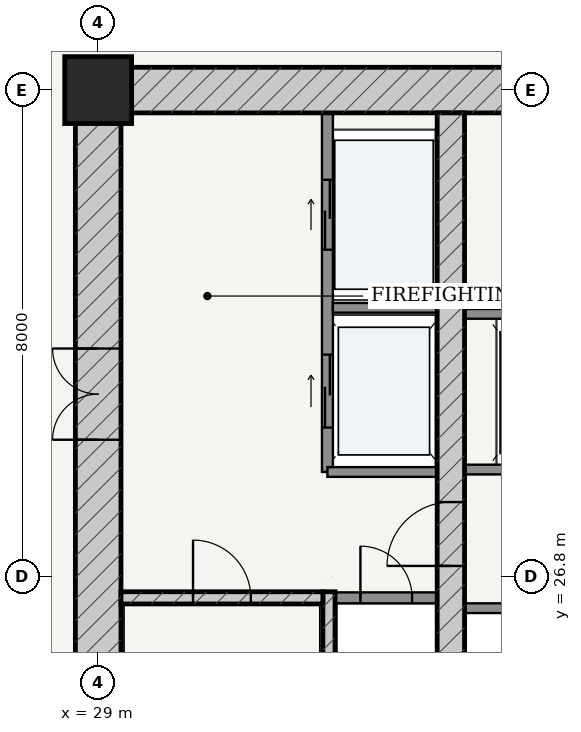
"""IFC4 building model, lengths in metres.
Left out: names, types, materials, properties, quantities, classifications, styles, units other than length and angle.
Written with IfcOpenShell. Run it as: python <this file> out.ifc"""

import sys

from ifc_helpers import new_model, si_unit, direction, frame, frame_2d, origin, origin_2d, place, context, subcontext, project, spatial, rectangle, extrude, source, transform, mapped, element, fill, save


model = new_model("IFC4")
c1 = context("Model", 3, precision=1e-05, world=origin(), true_north=direction((-0.2419218956, 0.970295726276)))
c2 = subcontext(c1, "Body", "Model", "MODEL_VIEW")
j1 = project(units=[si_unit("LENGTHUNIT", "METRE"), si_unit("PLANEANGLEUNIT", "RADIAN")], contexts=[c1])
p1 = place(None, origin())
s1 = spatial("IfcSite", under=j1, at=p1, CompositionType="ELEMENT")
p2 = place(p1, origin())
s2 = spatial("IfcBuilding", under=s1, at=p2, CompositionType="ELEMENT")
p3 = place(p2, frame((0.0, 0.0, 70.8)))
s3 = spatial("IfcBuildingStorey", under=s2, at=p3, CompositionType="ELEMENT", Elevation=70.8)
p4 = place(p3, frame((29.0, 34.8, 0.0), z_axis=(0.0, 0.0, 1.0), x_axis=(1.0, 0.0, 0.0)))
e1 = element("IfcColumn", 1, at=p4, inside=s3, PredefinedType="COLUMN", context=c2, shape_type="SweptSolid", body=[
    extrude(rectangle(XDim=1.1, YDim=1.1, at=origin_2d()), origin(), (0.0, 0.0, 1.0), 3.6),
])
p5 = place(p3, frame((28.625, 34.8, 0.0), z_axis=(0.0, 0.0, 1.0), x_axis=(1.0, 0.0, 0.0)))
e2 = element("IfcWall", 2, at=p5, inside=s3, PredefinedType="SHEAR", context=c2, shape_type="SweptSolid", body=[
    extrude(rectangle(XDim=18.75, YDim=0.75, at=frame_2d((9.375, 0.0))), origin(), (0.0, 0.0, 1.0), 3.15),
])
p6 = place(p5, frame((7.407, 0.0, 0.0)))
e3 = element("IfcOpeningElement", 3, at=p6, cuts=e2, PredefinedType="OPENING", context=c2, shape_type="SweptSolid", body=[
    extrude(rectangle(XDim=0.86, YDim=2.1, at=frame_2d((0.43, 1.05))), frame((0.0, 0.385, 0.0), z_axis=(0.0, -1.0, 0.0), x_axis=(1.0, 0.0, 0.0)), (0.0, 0.0, 1.0), 0.77),
])
p7 = place(p5, frame((10.488, 0.0, 0.0)))
e4 = element("IfcOpeningElement", 4, at=p7, cuts=e2, PredefinedType="OPENING", context=c2, shape_type="SweptSolid", body=[
    extrude(rectangle(XDim=0.85, YDim=2.1, at=frame_2d((0.425, 1.05))), frame((0.0, 0.385, 0.0), z_axis=(0.0, -1.0, 0.0), x_axis=(1.0, 0.0, 0.0)), (0.0, 0.0, 1.0), 0.77),
])
p8 = place(p3, frame((29.0, 19.175, 0.0), z_axis=(0.0, 0.0, 1.0), x_axis=(0.0, 1.0, 0.0)))
e5 = element("IfcWall", 5, at=p8, inside=s3, PredefinedType="SHEAR", context=c2, shape_type="SweptSolid", body=[
    extrude(rectangle(XDim=15.25, YDim=0.75, at=frame_2d((7.625, 0.0))), origin(), (0.0, 0.0, 1.0), 3.15),
])
p9 = place(p8, frame((9.875, 0.0, 0.0)))
e6 = element("IfcOpeningElement", 6, at=p9, cuts=e5, PredefinedType="OPENING", context=c2, shape_type="SweptSolid", body=[
    extrude(rectangle(XDim=1.5, YDim=2.2, at=frame_2d((0.75, 1.1))), frame((0.0, 0.385, 0.0), z_axis=(0.0, -1.0, 0.0), x_axis=(1.0, 0.0, 0.0)), (0.0, 0.0, 1.0), 0.77),
])
p10 = place(p3, frame((32.795, 19.175, 0.0), z_axis=(0.0, 0.0, 1.0), x_axis=(0.0, 1.0, 0.0)))
e7 = element("IfcWall", 7, at=p10, inside=s3, PredefinedType="SOLIDWALL", context=c2, shape_type="SweptSolid", body=[
    extrude(rectangle(XDim=7.375, YDim=0.2, at=frame_2d((3.688, 0.0))), origin(), (0.0, 0.0, 1.0), 3.15),
])
p11 = place(p3, frame((29.375, 26.45, 0.0), z_axis=(0.0, 0.0, 1.0), x_axis=(1.0, 0.0, 0.0)))
e8 = element("IfcWall", 8, at=p11, inside=s3, PredefinedType="SOLIDWALL", context=c2, shape_type="SweptSolid", body=[
    extrude(rectangle(XDim=3.32, YDim=0.2, at=frame_2d((1.66, 0.0))), origin(), (0.0, 0.0, 1.0), 3.15),
])
p12 = place(p11, frame((1.185, 0.0, 0.0)))
e9 = element("IfcOpeningElement", 9, at=p12, cuts=e8, PredefinedType="OPENING", context=c2, shape_type="SweptSolid", body=[
    extrude(rectangle(XDim=0.95, YDim=2.15, at=frame_2d((0.475, 1.075))), frame((0.0, 0.11, 0.0), z_axis=(0.0, -1.0, 0.0), x_axis=(1.0, 0.0, 0.0)), (0.0, 0.0, 1.0), 0.22),
])
p13 = place(p3, frame((34.8, 19.175, 0.0), z_axis=(0.0, 0.0, 1.0), x_axis=(0.0, 1.0, 0.0)))
e10 = element("IfcWall", 10, at=p13, inside=s3, PredefinedType="SHEAR", context=c2, shape_type="SweptSolid", body=[
    extrude(rectangle(XDim=15.25, YDim=0.45, at=frame_2d((7.625, 0.0))), origin(), (0.0, 0.0, 1.0), 3.15),
])
p14 = place(p13, frame((7.8, 0.0, 0.0)))
e11 = element("IfcOpeningElement", 11, at=p14, cuts=e10, PredefinedType="OPENING", context=c2, shape_type="SweptSolid", body=[
    extrude(rectangle(XDim=1.05, YDim=2.15, at=frame_2d((0.525, 1.075))), frame((0.0, 0.235, 0.0), z_axis=(0.0, -1.0, 0.0), x_axis=(1.0, 0.0, 0.0)), (0.0, 0.0, 1.0), 0.47),
])
p15 = place(p3, frame((32.9, 26.45, 0.0), z_axis=(0.0, 0.0, 1.0), x_axis=(1.0, 0.0, 0.0)))
e12 = element("IfcWall", 12, at=p15, inside=s3, PredefinedType="PARTITIONING", context=c2, shape_type="SweptSolid", body=[
    extrude(rectangle(XDim=1.675, YDim=0.18, at=frame_2d((0.837, 0.0))), origin(), (0.0, 0.0, 1.0), 3.15),
])
p16 = place(p15, frame((0.413, 0.0, 0.0)))
e13 = element("IfcOpeningElement", 13, at=p16, cuts=e12, PredefinedType="OPENING", context=c2, shape_type="SweptSolid", body=[
    extrude(rectangle(XDim=0.85, YDim=2.1, at=frame_2d((0.425, 1.05))), frame((0.0, 0.1, 0.0), z_axis=(0.0, -1.0, 0.0), x_axis=(1.0, 0.0, 0.0)), (0.0, 0.0, 1.0), 0.2),
])
p17 = place(p3, frame((32.77, 28.52, 0.0), z_axis=(0.0, 0.0, 1.0), x_axis=(0.0, 1.0, 0.0)))
e14 = element("IfcWall", 14, at=p17, inside=s3, PredefinedType="PARTITIONING", context=c2, shape_type="SweptSolid", body=[
    extrude(rectangle(XDim=5.905, YDim=0.18, at=frame_2d((2.953, 0.0))), origin(), (0.0, 0.0, 1.0), 3.15),
])
p18 = place(p17, frame((3.655, 0.0, 0.0)))
e15 = element("IfcOpeningElement", 15, at=p18, cuts=e14, PredefinedType="OPENING", context=c2, shape_type="SweptSolid", body=[
    extrude(rectangle(XDim=1.15, YDim=2.2, at=frame_2d((0.575, 1.1))), frame((0.0, 0.1, 0.0), z_axis=(0.0, -1.0, 0.0), x_axis=(1.0, 0.0, 0.0)), (0.0, 0.0, 1.0), 0.2),
])
p19 = place(p17, frame((0.73, 0.0, 0.0)))
e16 = element("IfcOpeningElement", 16, at=p19, cuts=e14, PredefinedType="OPENING", context=c2, shape_type="SweptSolid", body=[
    extrude(rectangle(XDim=1.2, YDim=2.25, at=frame_2d((0.6, 1.125))), frame((0.0, 0.1, 0.0), z_axis=(0.0, -1.0, 0.0), x_axis=(1.0, 0.0, 0.0)), (0.0, 0.0, 1.0), 0.2),
])
p20 = place(p3, frame((32.86, 31.22, 0.0), z_axis=(0.0, 0.0, 1.0), x_axis=(1.0, 0.0, 0.0)))
e17 = element("IfcWall", 17, at=p20, inside=s3, PredefinedType="PARTITIONING", context=c2, shape_type="SweptSolid", body=[
    extrude(rectangle(XDim=1.715, YDim=0.16, at=frame_2d((0.857, 0.0))), origin(), (0.0, 0.0, 1.0), 3.15),
])
p21 = place(p3, frame((32.77, 28.52, 0.0), z_axis=(0.0, 0.0, 1.0), x_axis=(1.0, 0.0, 0.0)))
e18 = element("IfcWall", 18, at=p21, inside=s3, PredefinedType="PARTITIONING", context=c2, shape_type="SweptSolid", body=[
    extrude(rectangle(XDim=1.805, YDim=0.16, at=frame_2d((0.902, 0.0))), origin(), (0.0, 0.0, 1.0), 3.15),
])
p22 = place(p3, frame((35.025, 28.56, 0.0), z_axis=(0.0, 0.0, 1.0), x_axis=(1.0, 0.0, 0.0)))
e19 = element("IfcWall", 19, at=p22, inside=s3, PredefinedType="PARTITIONING", context=c2, shape_type="SweptSolid", body=[
    extrude(rectangle(XDim=5.95, YDim=0.16, at=frame_2d((2.975, 0.0))), origin(), (0.0, 0.0, 1.0), 3.15),
])
p23 = place(p22, frame((0.76, 0.0, 0.0)))
e20 = element("IfcOpeningElement", 20, at=p23, cuts=e19, PredefinedType="OPENING", context=c2, shape_type="SweptSolid", body=[
    extrude(rectangle(XDim=1.1, YDim=2.2, at=frame_2d((0.55, 1.1))), frame((0.0, 0.09, 0.0), z_axis=(0.0, -1.0, 0.0), x_axis=(1.0, 0.0, 0.0)), (0.0, 0.0, 1.0), 0.18),
])
p24 = place(p22, frame((2.425, 0.0, 0.0)))
e21 = element("IfcOpeningElement", 21, at=p24, cuts=e19, PredefinedType="OPENING", context=c2, shape_type="SweptSolid", body=[
    extrude(rectangle(XDim=1.1, YDim=2.2, at=frame_2d((0.55, 1.1))), frame((0.0, 0.09, 0.0), z_axis=(0.0, -1.0, 0.0), x_axis=(1.0, 0.0, 0.0)), (0.0, 0.0, 1.0), 0.18),
])
p25 = place(p22, frame((4.09, 0.0, 0.0)))
e22 = element("IfcOpeningElement", 22, at=p25, cuts=e19, PredefinedType="OPENING", context=c2, shape_type="SweptSolid", body=[
    extrude(rectangle(XDim=1.1, YDim=2.2, at=frame_2d((0.55, 1.1))), frame((0.0, 0.09, 0.0), z_axis=(0.0, -1.0, 0.0), x_axis=(1.0, 0.0, 0.0)), (0.0, 0.0, 1.0), 0.18),
])
for number, where, z_axis, x_axis in (
    (23, (35.025, 31.12, 0.0), (0.0, 0.0, 1.0), (1.0, 0.0, 0.0)),
    (24, (35.025, 26.28, 0.0), (0.0, 0.0, 1.0), (1.0, 0.0, 0.0)),
):
    element("IfcWall", number, at=place(p3, frame(where, z_axis=z_axis, x_axis=x_axis)), inside=s3, PredefinedType="PARTITIONING", context=c2, shape_type="SweptSolid", body=[
        extrude(rectangle(XDim=5.95, YDim=0.16, at=frame_2d((2.975, 0.0))), origin(), (0.0, 0.0, 1.0), 3.15),
    ])
m1 = source(origin(), c2, "Body", "SweptSolid", [
    extrude(rectangle(XDim=1.5, YDim=2.2, at=frame_2d((0.75, 1.1))), frame((0.0, 0.025, 0.0), z_axis=(0.0, -1.0, 0.0), x_axis=(1.0, 0.0, 0.0)), (0.0, 0.0, 1.0), 0.05),
])
p26 = place(p9, origin())
e25 = element("IfcDoor", 25, at=p26, inside=s3, OperationType="DOUBLE_DOOR_SINGLE_SWING", PredefinedType="DOOR", context=c2, shape_type="MappedRepresentation", body=[
    mapped(m1, transform((0.0, 0.0, 0.0), scale=1.0)),
])
fill(e6, e25)
m2 = source(origin(), c2, "Body", "SweptSolid", [
    extrude(rectangle(XDim=1.05, YDim=2.15, at=frame_2d((0.525, 1.075))), frame((0.0, 0.025, 0.0), z_axis=(0.0, -1.0, 0.0), x_axis=(1.0, 0.0, 0.0)), (0.0, 0.0, 1.0), 0.05),
])
p27 = place(p14, origin())
e26 = element("IfcDoor", 26, at=p27, inside=s3, OperationType="SINGLE_SWING_LEFT", PredefinedType="DOOR", context=c2, shape_type="MappedRepresentation", body=[
    mapped(m2, transform((0.0, 0.0, 0.0), scale=1.0)),
])
fill(e11, e26)
m3 = source(origin(), c2, "Body", "SweptSolid", [
    extrude(rectangle(XDim=0.95, YDim=2.15, at=frame_2d((0.475, 1.075))), frame((0.0, 0.025, 0.0), z_axis=(0.0, -1.0, 0.0), x_axis=(1.0, 0.0, 0.0)), (0.0, 0.0, 1.0), 0.05),
])
p28 = place(p12, origin())
e27 = element("IfcDoor", 27, at=p28, inside=s3, OperationType="SINGLE_SWING_LEFT", PredefinedType="DOOR", context=c2, shape_type="MappedRepresentation", body=[
    mapped(m3, transform((0.0, 0.0, 0.0), scale=1.0)),
])
fill(e9, e27)
m4 = source(origin(), c2, "Body", "SweptSolid", [
    extrude(rectangle(XDim=0.85, YDim=2.1, at=frame_2d((0.425, 1.05))), frame((0.0, 0.025, 0.0), z_axis=(0.0, -1.0, 0.0), x_axis=(1.0, 0.0, 0.0)), (0.0, 0.0, 1.0), 0.05),
])
p29 = place(p16, origin())
e28 = element("IfcDoor", 28, at=p29, inside=s3, OperationType="SINGLE_SWING_LEFT", PredefinedType="DOOR", context=c2, shape_type="MappedRepresentation", body=[
    mapped(m4, transform((0.0, 0.0, 0.0), scale=1.0)),
])
fill(e13, e28)
m5 = source(origin(), c2, "Body", "SweptSolid", [
    extrude(rectangle(XDim=1.15, YDim=2.2, at=frame_2d((0.575, 1.1))), frame((0.0, 0.025, 0.0), z_axis=(0.0, -1.0, 0.0), x_axis=(1.0, 0.0, 0.0)), (0.0, 0.0, 1.0), 0.05),
])
p30 = place(p18, origin())
e29 = element("IfcDoor", 29, at=p30, inside=s3, OperationType="DOUBLE_DOOR_SLIDING", PredefinedType="DOOR", context=c2, shape_type="MappedRepresentation", body=[
    mapped(m5, transform((0.0, 0.0, 0.0), scale=1.0)),
])
fill(e15, e29)
m6 = source(origin(), c2, "Body", "SweptSolid", [
    extrude(rectangle(XDim=1.2, YDim=2.25, at=frame_2d((0.6, 1.125))), frame((0.0, 0.025, 0.0), z_axis=(0.0, -1.0, 0.0), x_axis=(1.0, 0.0, 0.0)), (0.0, 0.0, 1.0), 0.05),
])
p31 = place(p19, origin())
e30 = element("IfcDoor", 30, at=p31, inside=s3, OperationType="DOUBLE_DOOR_SLIDING", PredefinedType="DOOR", context=c2, shape_type="MappedRepresentation", body=[
    mapped(m6, transform((0.0, 0.0, 0.0), scale=1.0)),
])
fill(e16, e30)
save(model, sys.argv[1])
